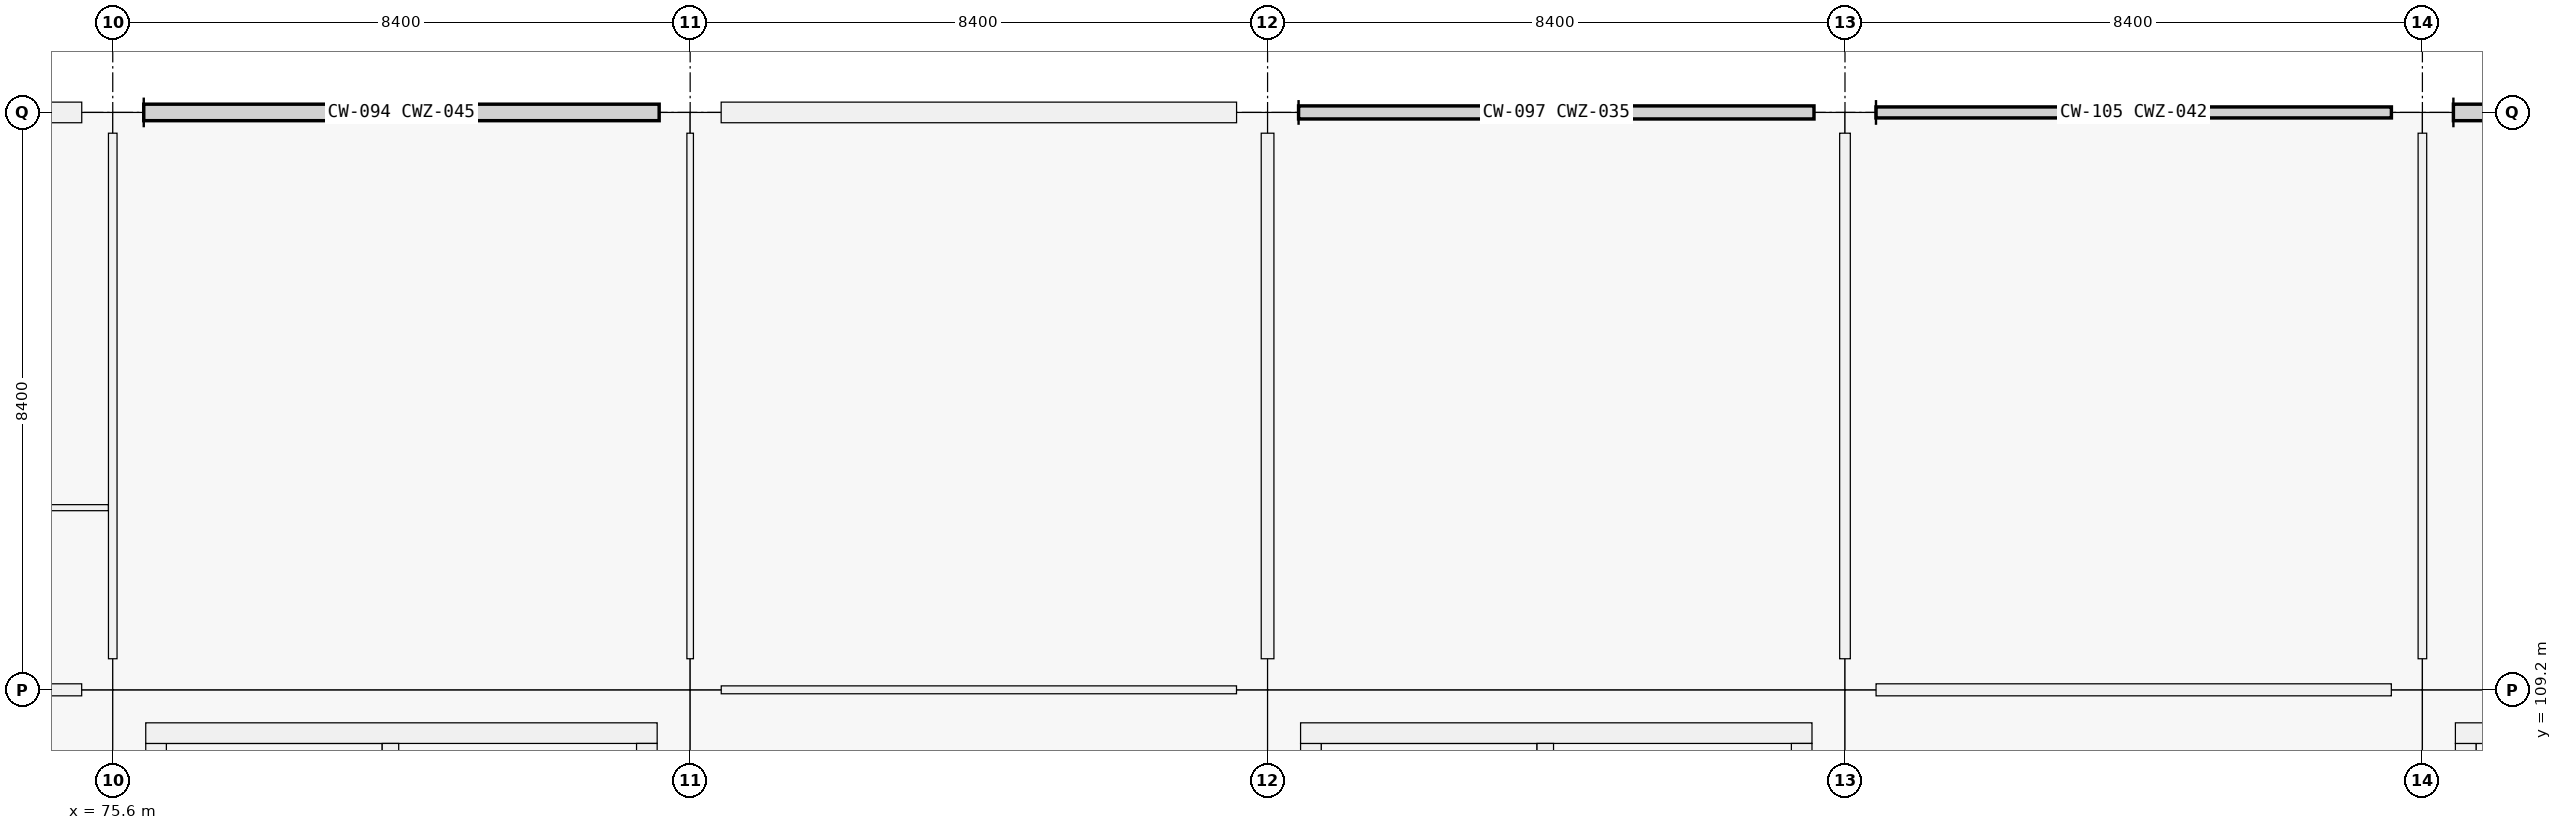
"""IFC4 building model, lengths in metres.
Left out: names, types, materials, properties, quantities, classifications, styles, units other than length and angle.
Written with IfcOpenShell. Run it as: python <this file> out.ifc"""

import sys

from ifc_helpers import new_model, si_unit, direction, frame, frame_2d, origin, origin_2d, place, context, subcontext, project, spatial, rectangle, extrude, element, fill, save


model = new_model("IFC4")
c1 = context("Model", 3, precision=1e-05, world=origin(), true_north=direction((0.0, 1.0)))
c2 = subcontext(c1, "Body", "Model", "MODEL_VIEW")
j1 = project(units=[si_unit("LENGTHUNIT", "METRE"), si_unit("PLANEANGLEUNIT", "RADIAN")], contexts=[c1])
p1 = place(None, origin())
s1 = spatial("IfcSite", under=j1, at=p1, CompositionType="ELEMENT")
p2 = place(p1, origin())
s2 = spatial("IfcBuilding", under=s1, at=p2, CompositionType="ELEMENT")
p3 = place(p2, frame((0.0, 0.0, 5.76)))
s3 = spatial("IfcBuildingStorey", under=s2, at=p3, CompositionType="ELEMENT", Elevation=5.76)
p4 = place(p3, frame((75.6, 109.2, 0.0), z_axis=(0.0, 0.0, 1.0), x_axis=(1.0, 0.0, 0.0)))
e1 = element("IfcColumn", 1, at=p4, inside=s3, PredefinedType="COLUMN", context=c2, shape_type="SweptSolid", body=[
    extrude(rectangle(XDim=0.9, YDim=0.9, at=origin_2d()), origin(), (0.0, 0.0, 1.0), 4.5),
])
p5 = place(p3, frame((75.6, 117.6, 0.0), z_axis=(0.0, 0.0, 1.0), x_axis=(1.0, 0.0, 0.0)))
e2 = element("IfcColumn", 2, at=p5, inside=s3, PredefinedType="COLUMN", context=c2, shape_type="SweptSolid", body=[
    extrude(rectangle(XDim=0.9, YDim=0.6, at=origin_2d()), origin(), (0.0, 0.0, 1.0), 4.5),
])
p6 = place(p3, frame((84.0, 109.2, 0.0), z_axis=(0.0, 0.0, 1.0), x_axis=(1.0, 0.0, 0.0)))
e3 = element("IfcColumn", 3, at=p6, inside=s3, PredefinedType="COLUMN", context=c2, shape_type="SweptSolid", body=[
    extrude(rectangle(XDim=0.9, YDim=0.9, at=origin_2d()), origin(), (0.0, 0.0, 1.0), 4.5),
])
p7 = place(p3, frame((84.0, 117.6, 0.0), z_axis=(0.0, 0.0, 1.0), x_axis=(1.0, 0.0, 0.0)))
e4 = element("IfcColumn", 4, at=p7, inside=s3, PredefinedType="COLUMN", context=c2, shape_type="SweptSolid", body=[
    extrude(rectangle(XDim=0.9, YDim=0.6, at=origin_2d()), origin(), (0.0, 0.0, 1.0), 4.5),
])
p8 = place(p3, frame((92.4, 109.2, 0.0), z_axis=(0.0, 0.0, 1.0), x_axis=(1.0, 0.0, 0.0)))
e5 = element("IfcColumn", 5, at=p8, inside=s3, PredefinedType="COLUMN", context=c2, shape_type="SweptSolid", body=[
    extrude(rectangle(XDim=0.9, YDim=0.9, at=origin_2d()), origin(), (0.0, 0.0, 1.0), 4.5),
])
p9 = place(p3, frame((92.4, 117.6, 0.0), z_axis=(0.0, 0.0, 1.0), x_axis=(1.0, 0.0, 0.0)))
e6 = element("IfcColumn", 6, at=p9, inside=s3, PredefinedType="COLUMN", context=c2, shape_type="SweptSolid", body=[
    extrude(rectangle(XDim=0.9, YDim=0.6, at=origin_2d()), origin(), (0.0, 0.0, 1.0), 4.5),
])
p10 = place(p3, frame((100.8, 109.2, 0.0), z_axis=(0.0, 0.0, 1.0), x_axis=(1.0, 0.0, 0.0)))
e7 = element("IfcColumn", 7, at=p10, inside=s3, PredefinedType="COLUMN", context=c2, shape_type="SweptSolid", body=[
    extrude(rectangle(XDim=0.9, YDim=0.9, at=origin_2d()), origin(), (0.0, 0.0, 1.0), 4.5),
])
p11 = place(p3, frame((100.8, 117.6, 0.0), z_axis=(0.0, 0.0, 1.0), x_axis=(1.0, 0.0, 0.0)))
e8 = element("IfcColumn", 8, at=p11, inside=s3, PredefinedType="COLUMN", context=c2, shape_type="SweptSolid", body=[
    extrude(rectangle(XDim=0.9, YDim=0.6, at=origin_2d()), origin(), (0.0, 0.0, 1.0), 4.5),
])
p12 = place(p3, frame((109.2, 109.2, 0.0), z_axis=(0.0, 0.0, 1.0), x_axis=(1.0, 0.0, 0.0)))
e9 = element("IfcColumn", 9, at=p12, inside=s3, PredefinedType="COLUMN", context=c2, shape_type="SweptSolid", body=[
    extrude(rectangle(XDim=0.9, YDim=0.9, at=origin_2d()), origin(), (0.0, 0.0, 1.0), 4.5),
])
p13 = place(p3, frame((109.2, 117.6, 0.0), z_axis=(0.0, 0.0, 1.0), x_axis=(1.0, 0.0, 0.0)))
e10 = element("IfcColumn", 10, at=p13, inside=s3, PredefinedType="COLUMN", context=c2, shape_type="SweptSolid", body=[
    extrude(rectangle(XDim=0.9, YDim=0.6, at=origin_2d()), origin(), (0.0, 0.0, 1.0), 4.5),
])
p14 = place(p3, frame((67.651, 117.6, 0.0), z_axis=(0.0, 0.0, 1.0), x_axis=(1.0, 0.0, 0.0)))
e11 = element("IfcWall", 11, at=p14, inside=s3, PredefinedType="SOLIDWALL", context=c2, shape_type="SweptSolid", body=[
    extrude(rectangle(XDim=7.498, YDim=0.3, at=frame_2d((3.749, 0.0))), origin(), (0.0, 0.0, 1.0), 3.4),
])
p15 = place(p14, frame((2.999, 0.0, 0.9)))
e12 = element("IfcOpeningElement", 12, at=p15, cuts=e11, PredefinedType="OPENING", context=c2, shape_type="SweptSolid", body=[
    extrude(rectangle(XDim=1.5, YDim=1.8, at=frame_2d((0.75, 0.9))), frame((0.0, 0.15, 0.0), z_axis=(0.0, -1.0, 0.0), x_axis=(1.0, 0.0, 0.0)), (0.0, 0.0, 1.0), 0.3),
])
p16 = place(p3, frame((84.451, 117.6, 0.0), z_axis=(0.0, 0.0, 1.0), x_axis=(1.0, 0.0, 0.0)))
e13 = element("IfcWall", 13, at=p16, inside=s3, PredefinedType="SOLIDWALL", context=c2, shape_type="SweptSolid", body=[
    extrude(rectangle(XDim=7.498, YDim=0.3, at=frame_2d((3.749, 0.0))), origin(), (0.0, 0.0, 1.0), 3.4),
])
p17 = place(p16, frame((2.399, 0.0, 0.9)))
e14 = element("IfcOpeningElement", 14, at=p17, cuts=e13, PredefinedType="OPENING", context=c2, shape_type="SweptSolid", body=[
    extrude(rectangle(XDim=2.7, YDim=1.2, at=frame_2d((1.35, 0.6))), frame((0.0, 0.15, 0.0), z_axis=(0.0, -1.0, 0.0), x_axis=(1.0, 0.0, 0.0)), (0.0, 0.0, 1.0), 0.3),
])
p18 = place(p3, frame((109.83, 101.58, 0.0), z_axis=(0.0, 0.0, 1.0), x_axis=(0.0, 1.0, 0.0)))
e15 = element("IfcWall", 15, at=p18, inside=s3, PredefinedType="SHEAR", context=c2, shape_type="SweptSolid", body=[
    extrude(rectangle(XDim=6.84, YDim=0.3, at=frame_2d((3.42, 0.0))), origin(), (0.0, 0.0, 1.0), 4.5),
])
p19 = place(p3, frame((109.68, 108.57, 0.0), z_axis=(0.0, 0.0, 1.0), x_axis=(1.0, 0.0, 0.0)))
e16 = element("IfcWall", 16, at=p19, inside=s3, PredefinedType="SHEAR", context=c2, shape_type="SweptSolid", body=[
    extrude(rectangle(XDim=7.44, YDim=0.3, at=frame_2d((3.72, 0.0))), origin(), (0.0, 0.0, 1.0), 4.5),
])
p20 = place(p3, frame((76.23, 101.58, 0.0), z_axis=(0.0, 0.0, 1.0), x_axis=(0.0, 1.0, 0.0)))
e17 = element("IfcWall", 17, at=p20, inside=s3, PredefinedType="SHEAR", context=c2, shape_type="SweptSolid", body=[
    extrude(rectangle(XDim=6.84, YDim=0.3, at=frame_2d((3.42, 0.0))), origin(), (0.0, 0.0, 1.0), 4.5),
])
p21 = place(p3, frame((76.08, 108.57, 0.0), z_axis=(0.0, 0.0, 1.0), x_axis=(1.0, 0.0, 0.0)))
e18 = element("IfcWall", 18, at=p21, inside=s3, PredefinedType="SHEAR", context=c2, shape_type="SweptSolid", body=[
    extrude(rectangle(XDim=7.44, YDim=0.3, at=frame_2d((3.72, 0.0))), origin(), (0.0, 0.0, 1.0), 4.5),
])
p22 = place(p3, frame((83.37, 108.42, 0.0), z_axis=(0.0, 0.0, 1.0), x_axis=(0.0, -1.0, 0.0)))
e19 = element("IfcWall", 19, at=p22, inside=s3, PredefinedType="SHEAR", context=c2, shape_type="SweptSolid", body=[
    extrude(rectangle(XDim=6.84, YDim=0.3, at=frame_2d((3.42, 0.0))), origin(), (0.0, 0.0, 1.0), 4.5),
])
p23 = place(p22, frame((3.97, 0.0, 0.0)))
e20 = element("IfcOpeningElement", 20, at=p23, cuts=e19, PredefinedType="OPENING", context=c2, shape_type="SweptSolid", body=[
    extrude(rectangle(XDim=1.5, YDim=2.15, at=frame_2d((0.75, 1.075))), frame((0.0, 0.15, 0.0), z_axis=(0.0, -1.0, 0.0), x_axis=(1.0, 0.0, 0.0)), (0.0, 0.0, 1.0), 0.3),
])
p24 = place(p3, frame((79.64, 101.58, 0.0), z_axis=(0.0, 0.0, 1.0), x_axis=(0.0, 1.0, 0.0)))
e21 = element("IfcWall", 21, at=p24, inside=s3, PredefinedType="SHEAR", context=c2, shape_type="SweptSolid", body=[
    extrude(rectangle(XDim=6.84, YDim=0.24, at=frame_2d((3.42, 0.0))), origin(), (0.0, 0.0, 1.0), 4.5),
])
p25 = place(p24, frame((0.12, 0.0, 0.0)))
e22 = element("IfcOpeningElement", 22, at=p25, cuts=e21, PredefinedType="OPENING", context=c2, shape_type="SweptSolid", body=[
    extrude(rectangle(XDim=1.0, YDim=2.15, at=frame_2d((0.5, 1.075))), frame((0.0, 0.12, 0.0), z_axis=(0.0, -1.0, 0.0), x_axis=(1.0, 0.0, 0.0)), (0.0, 0.0, 1.0), 0.24),
])
p26 = place(p3, frame((93.03, 101.58, 0.0), z_axis=(0.0, 0.0, 1.0), x_axis=(0.0, 1.0, 0.0)))
e23 = element("IfcWall", 23, at=p26, inside=s3, PredefinedType="SHEAR", context=c2, shape_type="SweptSolid", body=[
    extrude(rectangle(XDim=6.84, YDim=0.3, at=frame_2d((3.42, 0.0))), origin(), (0.0, 0.0, 1.0), 4.5),
])
p27 = place(p3, frame((92.88, 108.57, 0.0), z_axis=(0.0, 0.0, 1.0), x_axis=(1.0, 0.0, 0.0)))
e24 = element("IfcWall", 24, at=p27, inside=s3, PredefinedType="SHEAR", context=c2, shape_type="SweptSolid", body=[
    extrude(rectangle(XDim=7.44, YDim=0.3, at=frame_2d((3.72, 0.0))), origin(), (0.0, 0.0, 1.0), 4.5),
])
p28 = place(p3, frame((100.17, 108.42, 0.0), z_axis=(0.0, 0.0, 1.0), x_axis=(0.0, -1.0, 0.0)))
e25 = element("IfcWall", 25, at=p28, inside=s3, PredefinedType="SHEAR", context=c2, shape_type="SweptSolid", body=[
    extrude(rectangle(XDim=6.84, YDim=0.3, at=frame_2d((3.42, 0.0))), origin(), (0.0, 0.0, 1.0), 4.5),
])
p29 = place(p28, frame((3.97, 0.0, 0.0)))
e26 = element("IfcOpeningElement", 26, at=p29, cuts=e25, PredefinedType="OPENING", context=c2, shape_type="SweptSolid", body=[
    extrude(rectangle(XDim=1.5, YDim=2.15, at=frame_2d((0.75, 1.075))), frame((0.0, 0.15, 0.0), z_axis=(0.0, -1.0, 0.0), x_axis=(1.0, 0.0, 0.0)), (0.0, 0.0, 1.0), 0.3),
])
p30 = place(p3, frame((96.44, 101.58, 0.0), z_axis=(0.0, 0.0, 1.0), x_axis=(0.0, 1.0, 0.0)))
e27 = element("IfcWall", 27, at=p30, inside=s3, PredefinedType="SHEAR", context=c2, shape_type="SweptSolid", body=[
    extrude(rectangle(XDim=6.84, YDim=0.24, at=frame_2d((3.42, 0.0))), origin(), (0.0, 0.0, 1.0), 4.5),
])
p31 = place(p30, frame((0.12, 0.0, 0.0)))
e28 = element("IfcOpeningElement", 28, at=p31, cuts=e27, PredefinedType="OPENING", context=c2, shape_type="SweptSolid", body=[
    extrude(rectangle(XDim=1.0, YDim=2.15, at=frame_2d((0.5, 1.075))), frame((0.0, 0.12, 0.0), z_axis=(0.0, -1.0, 0.0), x_axis=(1.0, 0.0, 0.0)), (0.0, 0.0, 1.0), 0.24),
])
p32 = place(p3, frame((67.652, 109.2, 0.0), z_axis=(0.0, 0.0, 1.0), x_axis=(1.0, 0.0, 0.0)))
e29 = element("IfcWall", 29, at=p32, inside=s3, PredefinedType="PARTITIONING", context=c2, shape_type="SweptSolid", body=[
    extrude(rectangle(XDim=7.496, YDim=0.175, at=frame_2d((3.748, 0.0))), origin(), (0.0, 0.0, 1.0), 2.4),
])
p33 = place(p3, frame((84.452, 109.2, 0.0), z_axis=(0.0, 0.0, 1.0), x_axis=(1.0, 0.0, 0.0)))
e30 = element("IfcWall", 30, at=p33, inside=s3, PredefinedType="PARTITIONING", context=c2, shape_type="SweptSolid", body=[
    extrude(rectangle(XDim=7.496, YDim=0.115, at=frame_2d((3.748, 0.0))), origin(), (0.0, 0.0, 1.0), 2.4),
])
p34 = place(p33, frame((3.218, 0.0, 0.0)))
e31 = element("IfcOpeningElement", 31, at=p34, cuts=e30, PredefinedType="OPENING", context=c2, shape_type="SweptSolid", body=[
    extrude(rectangle(XDim=1.06, YDim=2.22, at=frame_2d((0.53, 1.11))), frame((0.0, 0.058, 0.0), z_axis=(0.0, -1.0, 0.0), x_axis=(1.0, 0.0, 0.0)), (0.0, 0.0, 1.0), 0.115),
])
p35 = place(p3, frame((101.252, 109.2, 0.0), z_axis=(0.0, 0.0, 1.0), x_axis=(1.0, 0.0, 0.0)))
e32 = element("IfcWall", 32, at=p35, inside=s3, PredefinedType="PARTITIONING", context=c2, shape_type="SweptSolid", body=[
    extrude(rectangle(XDim=7.496, YDim=0.175, at=frame_2d((3.748, 0.0))), origin(), (0.0, 0.0, 1.0), 2.4),
])
p36 = place(p35, frame((3.238, 0.0, 0.0)))
e33 = element("IfcOpeningElement", 33, at=p36, cuts=e32, PredefinedType="OPENING", context=c2, shape_type="SweptSolid", body=[
    extrude(rectangle(XDim=1.02, YDim=2.2, at=frame_2d((0.51, 1.1))), frame((0.0, 0.087, 0.0), z_axis=(0.0, -1.0, 0.0), x_axis=(1.0, 0.0, 0.0)), (0.0, 0.0, 1.0), 0.175),
])
p37 = place(p3, frame((75.6, 109.652, 0.0), z_axis=(0.0, 0.0, 1.0), x_axis=(0.0, 1.0, 0.0)))
e34 = element("IfcWall", 34, at=p37, inside=s3, PredefinedType="PARTITIONING", context=c2, shape_type="SweptSolid", body=[
    extrude(rectangle(XDim=7.646, YDim=0.125, at=frame_2d((3.823, 0.0))), origin(), (0.0, 0.0, 1.0), 2.4),
])
p38 = place(p3, frame((84.0, 109.652, 0.0), z_axis=(0.0, 0.0, 1.0), x_axis=(0.0, 1.0, 0.0)))
e35 = element("IfcWall", 35, at=p38, inside=s3, PredefinedType="PARTITIONING", context=c2, shape_type="SweptSolid", body=[
    extrude(rectangle(XDim=7.646, YDim=0.095, at=frame_2d((3.823, 0.0))), origin(), (0.0, 0.0, 1.0), 2.4),
])
p39 = place(p38, frame((3.353, 0.0, 0.0)))
e36 = element("IfcOpeningElement", 36, at=p39, cuts=e35, PredefinedType="OPENING", context=c2, shape_type="SweptSolid", body=[
    extrude(rectangle(XDim=0.94, YDim=2.15, at=frame_2d((0.47, 1.075))), frame((0.0, 0.047, 0.0), z_axis=(0.0, -1.0, 0.0), x_axis=(1.0, 0.0, 0.0)), (0.0, 0.0, 1.0), 0.095),
])
p40 = place(p3, frame((92.4, 109.652, 0.0), z_axis=(0.0, 0.0, 1.0), x_axis=(0.0, 1.0, 0.0)))
e37 = element("IfcWall", 37, at=p40, inside=s3, PredefinedType="PARTITIONING", context=c2, shape_type="SweptSolid", body=[
    extrude(rectangle(XDim=7.646, YDim=0.185, at=frame_2d((3.823, 0.0))), origin(), (0.0, 0.0, 1.0), 2.4),
])
p41 = place(p40, frame((3.363, 0.0, 0.0)))
e38 = element("IfcOpeningElement", 38, at=p41, cuts=e37, PredefinedType="OPENING", context=c2, shape_type="SweptSolid", body=[
    extrude(rectangle(XDim=0.92, YDim=2.15, at=frame_2d((0.46, 1.075))), frame((0.0, 0.093, 0.0), z_axis=(0.0, -1.0, 0.0), x_axis=(1.0, 0.0, 0.0)), (0.0, 0.0, 1.0), 0.185),
])
p42 = place(p3, frame((100.8, 109.652, 0.0), z_axis=(0.0, 0.0, 1.0), x_axis=(0.0, 1.0, 0.0)))
e39 = element("IfcWall", 39, at=p42, inside=s3, PredefinedType="PARTITIONING", context=c2, shape_type="SweptSolid", body=[
    extrude(rectangle(XDim=7.646, YDim=0.155, at=frame_2d((3.823, 0.0))), origin(), (0.0, 0.0, 1.0), 2.4),
])
p43 = place(p42, frame((3.343, 0.0, 0.0)))
e40 = element("IfcOpeningElement", 40, at=p43, cuts=e39, PredefinedType="OPENING", context=c2, shape_type="SweptSolid", body=[
    extrude(rectangle(XDim=0.96, YDim=2.18, at=frame_2d((0.48, 1.09))), frame((0.0, 0.078, 0.0), z_axis=(0.0, -1.0, 0.0), x_axis=(1.0, 0.0, 0.0)), (0.0, 0.0, 1.0), 0.155),
])
p44 = place(p3, frame((109.2, 109.652, 0.0), z_axis=(0.0, 0.0, 1.0), x_axis=(0.0, 1.0, 0.0)))
e41 = element("IfcWall", 41, at=p44, inside=s3, PredefinedType="PARTITIONING", context=c2, shape_type="SweptSolid", body=[
    extrude(rectangle(XDim=7.646, YDim=0.125, at=frame_2d((3.823, 0.0))), origin(), (0.0, 0.0, 1.0), 2.4),
])
p45 = place(p44, frame((3.298, 0.0, 0.0)))
e42 = element("IfcOpeningElement", 42, at=p45, cuts=e41, PredefinedType="OPENING", context=c2, shape_type="SweptSolid", body=[
    extrude(rectangle(XDim=1.05, YDim=2.12, at=frame_2d((0.525, 1.06))), frame((0.0, 0.062, 0.0), z_axis=(0.0, -1.0, 0.0), x_axis=(1.0, 0.0, 0.0)), (0.0, 0.0, 1.0), 0.125),
])
p46 = place(p3, frame((67.28, 111.85, 0.0), z_axis=(0.0, 0.0, 1.0), x_axis=(1.0, 0.0, 0.0)))
e43 = element("IfcWall", 43, at=p46, inside=s3, PredefinedType="PARTITIONING", context=c2, shape_type="SweptSolid", body=[
    extrude(rectangle(XDim=8.256, YDim=0.088, at=frame_2d((4.128, 0.0))), origin(), (0.0, 0.0, 1.0), 2.4),
])
p47 = place(p17, origin())
e44 = element("IfcWindow", 44, at=p47, inside=s3, PartitioningType="SINGLE_PANEL", PredefinedType="WINDOW", context=c2, shape_type="SweptSolid", body=[
    extrude(rectangle(XDim=2.7, YDim=1.2, at=frame_2d((1.35, 0.6))), frame((0.0, 0.03, 0.0), z_axis=(0.0, -1.0, 0.0), x_axis=(1.0, 0.0, 0.0)), (0.0, 0.0, 1.0), 0.06),
])
fill(e14, e44)
p48 = place(p34, origin())
e45 = element("IfcDoor", 45, at=p48, inside=s3, OperationType="SINGLE_SWING_RIGHT", PredefinedType="DOOR", context=c2, shape_type="SweptSolid", body=[
    extrude(rectangle(XDim=1.06, YDim=2.22, at=frame_2d((0.53, 1.11))), frame((0.0, 0.025, 0.0), z_axis=(0.0, -1.0, 0.0), x_axis=(1.0, 0.0, 0.0)), (0.0, 0.0, 1.0), 0.05),
])
fill(e31, e45)
p49 = place(p36, origin())
e46 = element("IfcDoor", 46, at=p49, inside=s3, OperationType="SINGLE_SWING_LEFT", PredefinedType="DOOR", context=c2, shape_type="SweptSolid", body=[
    extrude(rectangle(XDim=1.02, YDim=2.2, at=frame_2d((0.51, 1.1))), frame((0.0, 0.025, 0.0), z_axis=(0.0, -1.0, 0.0), x_axis=(1.0, 0.0, 0.0)), (0.0, 0.0, 1.0), 0.05),
])
fill(e33, e46)
p50 = place(p39, origin())
e47 = element("IfcDoor", 47, at=p50, inside=s3, OperationType="SINGLE_SWING_RIGHT", PredefinedType="DOOR", context=c2, shape_type="SweptSolid", body=[
    extrude(rectangle(XDim=0.94, YDim=2.15, at=frame_2d((0.47, 1.075))), frame((0.0, 0.025, 0.0), z_axis=(0.0, -1.0, 0.0), x_axis=(1.0, 0.0, 0.0)), (0.0, 0.0, 1.0), 0.05),
])
fill(e36, e47)
p51 = place(p41, origin())
e48 = element("IfcDoor", 48, at=p51, inside=s3, OperationType="SINGLE_SWING_LEFT", PredefinedType="DOOR", context=c2, shape_type="SweptSolid", body=[
    extrude(rectangle(XDim=0.92, YDim=2.15, at=frame_2d((0.46, 1.075))), frame((0.0, 0.025, 0.0), z_axis=(0.0, -1.0, 0.0), x_axis=(1.0, 0.0, 0.0)), (0.0, 0.0, 1.0), 0.05),
])
fill(e38, e48)
p52 = place(p45, origin())
e49 = element("IfcDoor", 49, at=p52, inside=s3, OperationType="SINGLE_SWING_RIGHT", PredefinedType="DOOR", context=c2, shape_type="SweptSolid", body=[
    extrude(rectangle(XDim=1.05, YDim=2.12, at=frame_2d((0.525, 1.06))), frame((0.0, 0.025, 0.0), z_axis=(0.0, -1.0, 0.0), x_axis=(1.0, 0.0, 0.0)), (0.0, 0.0, 1.0), 0.05),
])
fill(e42, e49)
p53 = place(p43, origin())
e50 = element("IfcDoor", 50, at=p53, inside=s3, OperationType="SINGLE_SWING_RIGHT", PredefinedType="DOOR", context=c2, shape_type="SweptSolid", body=[
    extrude(rectangle(XDim=0.96, YDim=2.18, at=frame_2d((0.48, 1.09))), frame((0.0, 0.025, 0.0), z_axis=(0.0, -1.0, 0.0), x_axis=(1.0, 0.0, 0.0)), (0.0, 0.0, 1.0), 0.05),
])
fill(e40, e50)
save(model, sys.argv[1])
